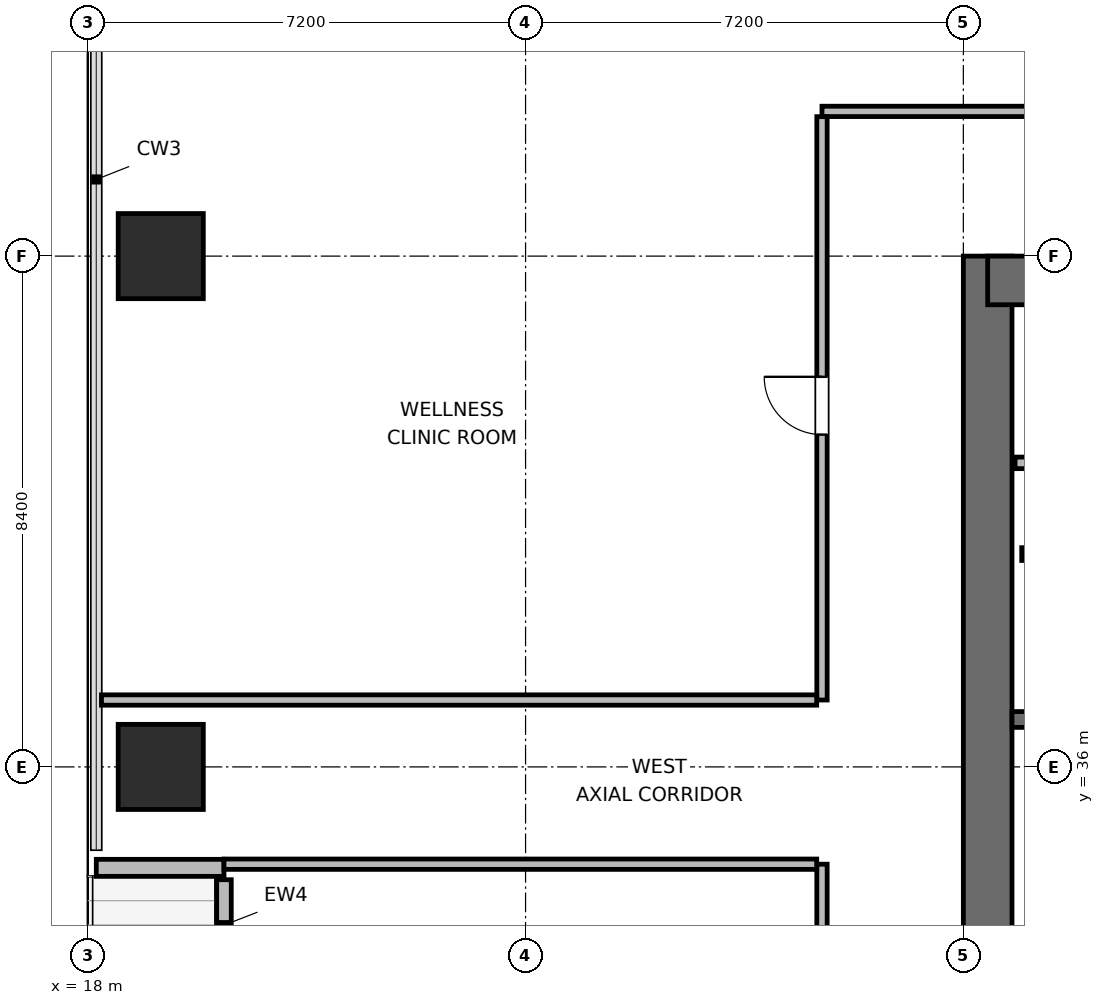
"""IFC4 building model, lengths in metres.
Left out: names, types, materials, properties, quantities, classifications, styles, units other than length and angle.
Written with IfcOpenShell. Run it as: python <this file> out.ifc"""

import sys

from ifc_helpers import new_model, si_unit, direction, frame, frame_2d, origin, origin_2d, place, context, subcontext, project, spatial, rectangle, extrude, element, fill, save


model = new_model("IFC4")
c1 = context("Model", 3, precision=1e-05, world=origin(), true_north=direction((0.0, 1.0)))
c2 = subcontext(c1, "Body", "Model", "MODEL_VIEW")
j1 = project(units=[si_unit("LENGTHUNIT", "METRE"), si_unit("PLANEANGLEUNIT", "RADIAN")], contexts=[c1])
p1 = place(None, origin())
s1 = spatial("IfcSite", under=j1, at=p1, CompositionType="ELEMENT")
p2 = place(p1, origin())
s2 = spatial("IfcBuilding", under=s1, at=p2, CompositionType="ELEMENT")
p3 = place(p2, frame((0.0, 0.0, 154.5)))
s3 = spatial("IfcBuildingStorey", under=s2, at=p3, CompositionType="ELEMENT", Elevation=154.5)
p4 = place(p3, frame((32.8, 27.6, 0.0), z_axis=(0.0, 0.0, 1.0), x_axis=(0.0, 1.0, 0.0)))
e1 = element("IfcWall", 1, at=p4, inside=s3, PredefinedType="SHEAR", context=c2, shape_type="SweptSolid", body=[
    extrude(rectangle(XDim=16.8, YDim=0.8, at=frame_2d((8.4, 0.0))), origin(), (0.0, 0.0, 1.0), 3.9),
])
p5 = place(p3, frame((32.8, 44.0, 0.0), z_axis=(0.0, 0.0, 1.0), x_axis=(1.0, 0.0, 0.0)))
e2 = element("IfcWall", 2, at=p5, inside=s3, PredefinedType="SHEAR", context=c2, shape_type="SweptSolid", body=[
    extrude(rectangle(XDim=9.2, YDim=0.8, at=frame_2d((4.6, 0.0))), origin(), (0.0, 0.0, 1.0), 3.9),
])
p6 = place(p5, frame((1.025, 0.0, 0.0)))
e3 = element("IfcOpeningElement", 3, at=p6, cuts=e2, PredefinedType="OPENING", context=c2, shape_type="SweptSolid", body=[
    extrude(rectangle(XDim=0.95, YDim=2.04, at=frame_2d((0.475, 1.02))), frame((0.0, 0.41, 0.0), z_axis=(0.0, -1.0, 0.0), x_axis=(1.0, 0.0, 0.0)), (0.0, 0.0, 1.0), 0.82),
])
p7 = place(p5, frame((4.275, 0.0, 0.0)))
e4 = element("IfcOpeningElement", 4, at=p7, cuts=e2, PredefinedType="OPENING", context=c2, shape_type="SweptSolid", body=[
    extrude(rectangle(XDim=0.9, YDim=2.02, at=frame_2d((0.45, 1.01))), frame((0.0, 0.41, 0.0), z_axis=(0.0, -1.0, 0.0), x_axis=(1.0, 0.0, 0.0)), (0.0, 0.0, 1.0), 0.82),
])
p8 = place(p5, frame((7.175, 0.0, 0.0)))
e5 = element("IfcOpeningElement", 5, at=p8, cuts=e2, PredefinedType="OPENING", context=c2, shape_type="SweptSolid", body=[
    extrude(rectangle(XDim=0.9, YDim=2.02, at=frame_2d((0.45, 1.01))), frame((0.0, 0.41, 0.0), z_axis=(0.0, -1.0, 0.0), x_axis=(1.0, 0.0, 0.0)), (0.0, 0.0, 1.0), 0.82),
])
p9 = place(p3, frame((33.2, 36.78, 0.0), z_axis=(0.0, 0.0, 1.0), x_axis=(1.0, 0.0, 0.0)))
e6 = element("IfcWall", 6, at=p9, inside=s3, PredefinedType="SHEAR", context=c2, shape_type="SweptSolid", body=[
    extrude(rectangle(XDim=3.91, YDim=0.26, at=frame_2d((1.955, 0.0))), origin(), (0.0, 0.0, 1.0), 3.9),
])
for number, where, z_axis, x_axis in (
    (7, (19.2, 36.0, 0.0), (0.0, 0.0, 1.0), (1.0, 0.0, 0.0)),
    (8, (19.2, 44.4, 0.0), (0.0, 0.0, 1.0), (1.0, 0.0, 0.0)),
):
    element("IfcColumn", number, at=place(p3, frame(where, z_axis=z_axis, x_axis=x_axis)), inside=s3, PredefinedType="COLUMN", context=c2, shape_type="SweptSolid", body=[
        extrude(rectangle(XDim=1.4, YDim=1.4, at=origin_2d()), origin(), (0.0, 0.0, 1.0), 3.9),
    ])
p10 = place(p3, frame((20.24, 29.455, 0.0), z_axis=(0.0, 0.0, 1.0), x_axis=(0.0, 1.0, 0.0)))
e9 = element("IfcWall", 9, at=p10, inside=s3, PredefinedType="SOLIDWALL", context=c2, shape_type="SweptSolid", body=[
    extrude(rectangle(XDim=4.69, YDim=0.24, at=frame_2d((2.345, 0.0))), origin(), (0.0, 0.0, 1.0), 3.248),
])
p11 = place(p10, frame((1.845, 0.0, 0.0)))
e10 = element("IfcOpeningElement", 10, at=p11, cuts=e9, PredefinedType="OPENING", context=c2, shape_type="SweptSolid", body=[
    extrude(rectangle(XDim=1.0, YDim=2.02, at=frame_2d((0.5, 1.01))), frame((0.0, 0.13, 0.0), z_axis=(0.0, -1.0, 0.0), x_axis=(1.0, 0.0, 0.0)), (0.0, 0.0, 1.0), 0.26),
])
p12 = place(p3, frame((20.24, 34.34, 0.0), z_axis=(0.0, 0.0, 1.0), x_axis=(-1.0, 0.0, 0.0)))
e11 = element("IfcWall", 11, at=p12, inside=s3, PredefinedType="SOLIDWALL", context=c2, shape_type="SweptSolid", body=[
    extrude(rectangle(XDim=2.1, YDim=0.28, at=frame_2d((1.05, 0.0))), origin(), (0.0, 0.0, 1.0), 3.116),
])
p13 = place(p3, frame((33.25, 41.0, 0.0), z_axis=(0.0, 0.0, 1.0), x_axis=(1.0, 0.0, 0.0)))
e12 = element("IfcWall", 12, at=p13, inside=s3, PredefinedType="PLUMBINGWALL", context=c2, shape_type="SweptSolid", body=[
    extrude(rectangle(XDim=8.3, YDim=0.19, at=frame_2d((4.15, 0.0))), origin(), (0.0, 0.0, 1.0), 3.68),
])
p14 = place(p3, frame((33.36, 39.5, 0.0), z_axis=(0.0, 0.0, 1.0), x_axis=(1.0, 0.0, 0.0)))
e13 = element("IfcWall", 13, at=p14, inside=s3, PredefinedType="PARTITIONING", context=c2, shape_type="SweptSolid", body=[
    extrude(rectangle(XDim=1.86, YDim=0.21, at=frame_2d((0.93, 0.0))), origin(), (0.0, 0.0, 1.0), 3.68),
])
p15 = place(p3, frame((30.075, 46.78, 0.0), z_axis=(0.0, 0.0, 1.0), x_axis=(1.0, 0.0, 0.0)))
e14 = element("IfcWall", 14, at=p15, inside=s3, PredefinedType="PARTITIONING", context=c2, shape_type="SweptSolid", body=[
    extrude(rectangle(XDim=33.525, YDim=0.17, at=frame_2d((16.763, 0.0))), origin(), (0.0, 0.0, 1.0), 3.68),
])
p16 = place(p15, frame((4.543, 0.0, 0.0)))
e15 = element("IfcOpeningElement", 15, at=p16, cuts=e14, PredefinedType="OPENING", context=c2, shape_type="SweptSolid", body=[
    extrude(rectangle(XDim=0.95, YDim=2.04, at=frame_2d((0.475, 1.02))), frame((0.0, 0.095, 0.0), z_axis=(0.0, -1.0, 0.0), x_axis=(1.0, 0.0, 0.0)), (0.0, 0.0, 1.0), 0.19),
])
p17 = place(p15, frame((11.37, 0.0, 0.0)))
e16 = element("IfcOpeningElement", 16, at=p17, cuts=e14, PredefinedType="OPENING", context=c2, shape_type="SweptSolid", body=[
    extrude(rectangle(XDim=0.95, YDim=2.04, at=frame_2d((0.475, 1.02))), frame((0.0, 0.095, 0.0), z_axis=(0.0, -1.0, 0.0), x_axis=(1.0, 0.0, 0.0)), (0.0, 0.0, 1.0), 0.19),
])
p18 = place(p15, frame((18.905, 0.0, 0.0)))
e17 = element("IfcOpeningElement", 17, at=p18, cuts=e14, PredefinedType="OPENING", context=c2, shape_type="SweptSolid", body=[
    extrude(rectangle(XDim=0.95, YDim=2.04, at=frame_2d((0.475, 1.02))), frame((0.0, 0.095, 0.0), z_axis=(0.0, -1.0, 0.0), x_axis=(1.0, 0.0, 0.0)), (0.0, 0.0, 1.0), 0.19),
])
p19 = place(p15, frame((27.74, 0.0, 0.0)))
e18 = element("IfcOpeningElement", 18, at=p19, cuts=e14, PredefinedType="OPENING", context=c2, shape_type="SweptSolid", body=[
    extrude(rectangle(XDim=0.95, YDim=2.04, at=frame_2d((0.475, 1.02))), frame((0.0, 0.095, 0.0), z_axis=(0.0, -1.0, 0.0), x_axis=(1.0, 0.0, 0.0)), (0.0, 0.0, 1.0), 0.19),
])
p20 = place(p15, frame((31.95, 0.0, 0.0)))
e19 = element("IfcOpeningElement", 19, at=p20, cuts=e14, PredefinedType="OPENING", context=c2, shape_type="SweptSolid", body=[
    extrude(rectangle(XDim=0.95, YDim=2.04, at=frame_2d((0.475, 1.02))), frame((0.0, 0.095, 0.0), z_axis=(0.0, -1.0, 0.0), x_axis=(1.0, 0.0, 0.0)), (0.0, 0.0, 1.0), 0.19),
])
p21 = place(p3, frame((30.075, 25.307, 0.0), z_axis=(0.0, 0.0, 1.0), x_axis=(0.0, 1.0, 0.0)))
e20 = element("IfcWall", 20, at=p21, inside=s3, PredefinedType="PARTITIONING", context=c2, shape_type="SweptSolid", body=[
    extrude(rectangle(XDim=9.093, YDim=0.17, at=frame_2d((4.546, 0.0))), origin(), (0.0, 0.0, 1.0), 3.68),
])
p22 = place(p21, frame((4.028, 0.0, 0.0)))
e21 = element("IfcOpeningElement", 21, at=p22, cuts=e20, PredefinedType="OPENING", context=c2, shape_type="SweptSolid", body=[
    extrude(rectangle(XDim=0.95, YDim=2.04, at=frame_2d((0.475, 1.02))), frame((0.0, 0.095, 0.0), z_axis=(0.0, -1.0, 0.0), x_axis=(1.0, 0.0, 0.0)), (0.0, 0.0, 1.0), 0.19),
])
p23 = place(p3, frame((30.075, 37.1, 0.0), z_axis=(0.0, 0.0, 1.0), x_axis=(0.0, 1.0, 0.0)))
e22 = element("IfcWall", 22, at=p23, inside=s3, PredefinedType="PARTITIONING", context=c2, shape_type="SweptSolid", body=[
    extrude(rectangle(XDim=9.593, YDim=0.17, at=frame_2d((4.796, 0.0))), origin(), (0.0, 0.0, 1.0), 3.68),
])
p24 = place(p23, frame((4.365, 0.0, 0.0)))
e23 = element("IfcOpeningElement", 23, at=p24, cuts=e22, PredefinedType="OPENING", context=c2, shape_type="SweptSolid", body=[
    extrude(rectangle(XDim=0.95, YDim=2.04, at=frame_2d((0.475, 1.02))), frame((0.0, 0.095, 0.0), z_axis=(0.0, -1.0, 0.0), x_axis=(1.0, 0.0, 0.0)), (0.0, 0.0, 1.0), 0.19),
])
p25 = place(p3, frame((20.24, 34.4, 0.0), z_axis=(0.0, 0.0, 1.0), x_axis=(1.0, 0.0, 0.0)))
e24 = element("IfcWall", 24, at=p25, inside=s3, PredefinedType="PARTITIONING", context=c2, shape_type="SweptSolid", body=[
    extrude(rectangle(XDim=9.748, YDim=0.17, at=frame_2d((4.874, 0.0))), origin(), (0.0, 0.0, 1.0), 3.68),
])
p26 = place(p3, frame((18.225, 37.1, 0.0), z_axis=(0.0, 0.0, 1.0), x_axis=(1.0, 0.0, 0.0)))
e25 = element("IfcWall", 25, at=p26, inside=s3, PredefinedType="PARTITIONING", context=c2, shape_type="SweptSolid", body=[
    extrude(rectangle(XDim=11.763, YDim=0.17, at=frame_2d((5.881, 0.0))), origin(), (0.0, 0.0, 1.0), 3.68),
])
p27 = place(p24, origin())
e26 = element("IfcDoor", 26, at=p27, inside=s3, OperationType="SINGLE_SWING_RIGHT", PredefinedType="DOOR", context=c2, shape_type="SweptSolid", body=[
    extrude(rectangle(XDim=0.95, YDim=2.04, at=frame_2d((0.475, 1.02))), frame((0.0, 0.025, 0.0), z_axis=(0.0, -1.0, 0.0), x_axis=(1.0, 0.0, 0.0)), (0.0, 0.0, 1.0), 0.05),
])
fill(e23, e26)
save(model, sys.argv[1])
